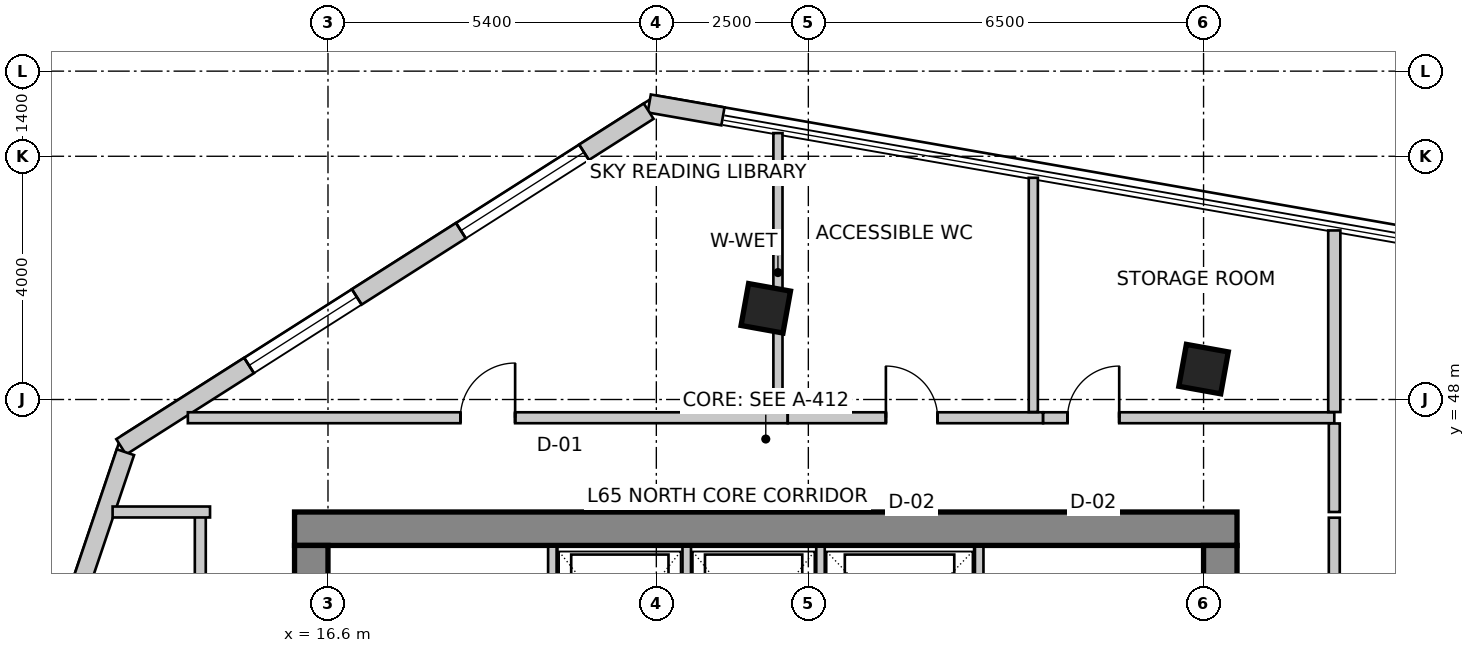
"""IFC4 building model, lengths in metres.
Left out: names, types, materials, properties, quantities, classifications, styles, units other than length and angle.
Written with IfcOpenShell. Run it as: python <this file> out.ifc"""

import sys

from ifc_helpers import new_model, si_unit, direction, frame, frame_2d, origin, origin_2d, place, context, subcontext, project, spatial, rectangle, extrude, source, transform, mapped, element, fill, save


model = new_model("IFC4")
c1 = context("Model", 3, precision=1e-05, world=origin(), true_north=direction((0.0, 1.0)))
c2 = subcontext(c1, "Body", "Model", "MODEL_VIEW")
j1 = project(units=[si_unit("LENGTHUNIT", "METRE"), si_unit("PLANEANGLEUNIT", "RADIAN")], contexts=[c1])
p1 = place(None, origin())
s1 = spatial("IfcSite", under=j1, at=p1, CompositionType="ELEMENT")
p2 = place(p1, origin())
s2 = spatial("IfcBuilding", under=s1, at=p2, CompositionType="ELEMENT")
p3 = place(p2, frame((0.0, 0.0, 256.5)))
s3 = spatial("IfcBuildingStorey", under=s2, at=p3, CompositionType="ELEMENT", Elevation=256.5)
p4 = place(p3, frame((16.05, 45.875, 0.0), z_axis=(0.0, 0.0, 1.0), x_axis=(1.0, 0.0, 0.0)))
e1 = element("IfcWall", 1, at=p4, inside=s3, PredefinedType="SHEAR", context=c2, shape_type="SweptSolid", body=[
    extrude(rectangle(XDim=15.5, YDim=0.55, at=frame_2d((7.75, 0.0))), origin(), (0.0, 0.0, 1.0), 3.6),
])
p5 = place(p3, frame((16.325, 34.2, 0.0), z_axis=(0.0, 0.0, 1.0), x_axis=(0.0, 1.0, 0.0)))
e2 = element("IfcWall", 2, at=p5, inside=s3, PredefinedType="SHEAR", context=c2, shape_type="SweptSolid", body=[
    extrude(rectangle(XDim=11.4, YDim=0.55, at=frame_2d((5.7, 0.0))), origin(), (0.0, 0.0, 1.0), 3.6),
])
m1 = source(origin(), c2, "Body", "SweptSolid", [
    extrude(rectangle(XDim=1.1, YDim=2.15, at=frame_2d((0.55, 1.075))), frame((0.0, 0.285, 0.0), z_axis=(0.0, -1.0, 0.0), x_axis=(1.0, 0.0, 0.0)), (0.0, 0.0, 1.0), 0.57),
])
p6 = place(p5, frame((7.15, 0.0, 0.0)))
e3 = element("IfcOpeningElement", 3, at=p6, cuts=e2, PredefinedType="OPENING", context=c2, shape_type="MappedRepresentation", body=[
    mapped(m1, transform((0.0, 0.0, 0.0), scale=1.0)),
])
p7 = place(p3, frame((31.275, 34.2, 0.0), z_axis=(0.0, 0.0, 1.0), x_axis=(0.0, 1.0, 0.0)))
e4 = element("IfcWall", 4, at=p7, inside=s3, PredefinedType="SHEAR", context=c2, shape_type="SweptSolid", body=[
    extrude(rectangle(XDim=11.4, YDim=0.55, at=frame_2d((5.7, 0.0))), origin(), (0.0, 0.0, 1.0), 3.6),
])
p8 = place(p7, frame((7.35, 0.0, 0.0)))
e5 = element("IfcOpeningElement", 5, at=p8, cuts=e4, PredefinedType="OPENING", context=c2, shape_type="MappedRepresentation", body=[
    mapped(m1, transform((0.0, 0.0, 0.0), scale=1.0)),
])
m2 = source(origin(), c2, "Body", "SweptSolid", [
    extrude(rectangle(XDim=0.7, YDim=0.7, at=origin_2d()), origin(), (0.0, 0.0, 1.0), 3.6),
])
for number, where, z_axis, x_axis in (
    (6, (23.8, 49.5, 0.0), (0.0, 0.0, 1.0), (0.984, -0.177, 0.0)),
    (7, (31.0, 48.5, 0.0), (0.0, 0.0, 1.0), (0.984, -0.177, 0.0)),
):
    element("IfcColumn", number, at=place(p3, frame(where, z_axis=z_axis, x_axis=x_axis)), inside=s3, PredefinedType="COLUMN", context=c2, shape_type="MappedRepresentation", body=[
        mapped(m2, transform((0.0, 0.0, 0.0), scale=1.0)),
    ])
p9 = place(p3, frame((23.095, 52.656, 0.0), z_axis=(0.0, 0.0, 1.0), x_axis=(-0.985008549623, 0.172505527937, 0.0)))
e8 = element("IfcWall", 8, at=p9, inside=s3, PredefinedType="SOLIDWALL", context=c2, shape_type="SweptSolid", body=[
    extrude(rectangle(XDim=1.23, YDim=0.3, at=frame_2d((0.615, 0.0))), origin(), (0.0, 0.0, 1.0), 3.35),
])
p10 = place(p3, frame((21.874, 52.742, 0.0), z_axis=(0.0, 0.0, 1.0), x_axis=(-0.84365659959, -0.536883173482, 0.0)))
e9 = element("IfcWall", 9, at=p10, inside=s3, PredefinedType="SOLIDWALL", context=c2, shape_type="SweptSolid", body=[
    extrude(rectangle(XDim=10.283, YDim=0.3, at=frame_2d((5.142, 0.0))), origin(), (0.0, 0.0, 1.0), 3.35),
])
m3 = source(origin(), c2, "Body", "SweptSolid", [
    extrude(rectangle(XDim=2.4, YDim=2.2, at=frame_2d((1.2, 1.1))), frame((0.0, 0.16, 0.0), z_axis=(0.0, -1.0, 0.0), x_axis=(1.0, 0.0, 0.0)), (0.0, 0.0, 1.0), 0.32),
])
p11 = place(p10, frame((1.26, 0.0, 0.85)))
e10 = element("IfcOpeningElement", 10, at=p11, cuts=e9, PredefinedType="OPENING", context=c2, shape_type="MappedRepresentation", body=[
    mapped(m3, transform((0.0, 0.0, 0.0), scale=1.0)),
])
m4 = source(origin(), c2, "Body", "SweptSolid", [
    extrude(rectangle(XDim=2.1, YDim=2.0, at=frame_2d((1.05, 1.0))), frame((0.0, 0.16, 0.0), z_axis=(0.0, -1.0, 0.0), x_axis=(1.0, 0.0, 0.0)), (0.0, 0.0, 1.0), 0.32),
])
p12 = place(p10, frame((5.69, 0.0, 0.85)))
e11 = element("IfcOpeningElement", 11, at=p12, cuts=e9, PredefinedType="OPENING", context=c2, shape_type="MappedRepresentation", body=[
    mapped(m4, transform((0.0, 0.0, 0.0), scale=1.0)),
])
p13 = place(p3, frame((13.269, 47.134, 0.0), z_axis=(0.0, 0.0, 1.0), x_axis=(-0.3199211297, -0.947444178182, 0.0)))
e12 = element("IfcWall", 12, at=p13, inside=s3, PredefinedType="SOLIDWALL", context=c2, shape_type="SweptSolid", body=[
    extrude(rectangle(XDim=16.132, YDim=0.3, at=frame_2d((8.066, 0.0))), origin(), (0.0, 0.0, 1.0), 3.35),
])
p14 = place(p13, frame((2.585, 0.0, 0.85)))
e13 = element("IfcOpeningElement", 13, at=p14, cuts=e12, PredefinedType="OPENING", context=c2, shape_type="MappedRepresentation", body=[
    mapped(m4, transform((0.0, 0.0, 0.0), scale=1.0)),
])
p15 = place(p13, frame((7.267, 0.0, 0.85)))
e14 = element("IfcOpeningElement", 14, at=p15, cuts=e12, PredefinedType="OPENING", context=c2, shape_type="MappedRepresentation", body=[
    mapped(m3, transform((0.0, 0.0, 0.0), scale=1.0)),
])
p16 = place(p13, frame((12.249, 0.0, 0.85)))
e15 = element("IfcOpeningElement", 15, at=p16, cuts=e12, PredefinedType="OPENING", context=c2, shape_type="MappedRepresentation", body=[
    mapped(m4, transform((0.0, 0.0, 0.0), scale=1.0)),
])
for number, where, z_axis, x_axis in (
    (16, (20.29, 43.28, 0.0), (0.0, 0.0, 1.0), (0.0, 1.0, 0.0)),
    (17, (27.31, 43.28, 0.0), (0.0, 0.0, 1.0), (0.0, 1.0, 0.0)),
):
    element("IfcWall", number, at=place(p3, frame(where, z_axis=z_axis, x_axis=x_axis)), inside=s3, PredefinedType="SOLIDWALL", context=c2, shape_type="SweptSolid", body=[
        extrude(rectangle(XDim=2.3, YDim=0.14, at=frame_2d((1.15, 0.0))), origin(), (0.0, 0.0, 1.0), 3.35),
    ])
for number, where, z_axis, x_axis in (
    (18, (22.5, 43.02, 0.0), (0.0, 0.0, 1.0), (0.0, 1.0, 0.0)),
    (19, (24.7, 43.02, 0.0), (0.0, 0.0, 1.0), (0.0, 1.0, 0.0)),
):
    element("IfcWall", number, at=place(p3, frame(where, z_axis=z_axis, x_axis=x_axis)), inside=s3, PredefinedType="SOLIDWALL", context=c2, shape_type="SweptSolid", body=[
        extrude(rectangle(XDim=2.56, YDim=0.14, at=frame_2d((1.28, 0.0))), origin(), (0.0, 0.0, 1.0), 3.35),
    ])
p17 = place(p3, frame((14.5, 33.744, 0.0), z_axis=(0.0, 0.0, 1.0), x_axis=(0.0, 1.0, 0.0)))
e20 = element("IfcWall", 20, at=p17, inside=s3, PredefinedType="PARTITIONING", context=c2, shape_type="SweptSolid", body=[
    extrude(rectangle(XDim=12.406, YDim=0.18, at=frame_2d((6.203, 0.0))), origin(), (0.0, 0.0, 1.0), 3.35),
])
m5 = source(origin(), c2, "Body", "SweptSolid", [
    extrude(rectangle(XDim=0.9, YDim=2.15, at=frame_2d((0.45, 1.075))), frame((0.0, 0.1, 0.0), z_axis=(0.0, -1.0, 0.0), x_axis=(1.0, 0.0, 0.0)), (0.0, 0.0, 1.0), 0.2),
])
p18 = place(p17, frame((4.37, 0.0, 0.0)))
e21 = element("IfcOpeningElement", 21, at=p18, cuts=e20, PredefinedType="OPENING", context=c2, shape_type="MappedRepresentation", body=[
    mapped(m5, transform((0.0, 0.0, 0.0), scale=1.0)),
])
p19 = place(p3, frame((14.66, 46.15, 0.0), z_axis=(0.0, 0.0, 1.0), x_axis=(-1.0, 0.0, 0.0)))
e22 = element("IfcWall", 22, at=p19, inside=s3, PredefinedType="PARTITIONING", context=c2, shape_type="SweptSolid", body=[
    extrude(rectangle(XDim=1.602, YDim=0.18, at=frame_2d((0.801, 0.0))), origin(), (0.0, 0.0, 1.0), 3.35),
])
p20 = place(p3, frame((14.295, 47.7, 0.0), z_axis=(0.0, 0.0, 1.0), x_axis=(1.0, 0.0, 0.0)))
e23 = element("IfcWall", 23, at=p20, inside=s3, PredefinedType="PARTITIONING", context=c2, shape_type="SweptSolid", body=[
    extrude(rectangle(XDim=9.865, YDim=0.18, at=frame_2d((4.932, 0.0))), origin(), (0.0, 0.0, 1.0), 3.034),
])
p21 = place(p20, frame((4.482, 0.0, 0.0)))
e24 = element("IfcOpeningElement", 24, at=p21, cuts=e23, PredefinedType="OPENING", context=c2, shape_type="MappedRepresentation", body=[
    mapped(m5, transform((0.0, 0.0, 0.0), scale=1.0)),
])
p22 = place(p3, frame((24.162, 47.7, 0.0), z_axis=(0.0, 0.0, 1.0), x_axis=(1.0, 0.0, 0.0)))
e25 = element("IfcWall", 25, at=p22, inside=s3, PredefinedType="PARTITIONING", context=c2, shape_type="SweptSolid", body=[
    extrude(rectangle(XDim=4.198, YDim=0.18, at=frame_2d((2.099, 0.0))), origin(), (0.0, 0.0, 1.0), 3.35),
])
m6 = source(origin(), c2, "Body", "SweptSolid", [
    extrude(rectangle(XDim=0.85, YDim=2.15, at=frame_2d((0.425, 1.075))), frame((0.0, 0.1, 0.0), z_axis=(0.0, -1.0, 0.0), x_axis=(1.0, 0.0, 0.0)), (0.0, 0.0, 1.0), 0.2),
])
p23 = place(p22, frame((1.613, 0.0, 0.0)))
e26 = element("IfcOpeningElement", 26, at=p23, cuts=e25, PredefinedType="OPENING", context=c2, shape_type="MappedRepresentation", body=[
    mapped(m6, transform((0.0, 0.0, 0.0), scale=1.0)),
])
p24 = place(p3, frame((28.362, 47.7, 0.0), z_axis=(0.0, 0.0, 1.0), x_axis=(1.0, 0.0, 0.0)))
e27 = element("IfcWall", 27, at=p24, inside=s3, PredefinedType="PARTITIONING", context=c2, shape_type="SweptSolid", body=[
    extrude(rectangle(XDim=4.788, YDim=0.18, at=frame_2d((2.394, 0.0))), origin(), (0.0, 0.0, 1.0), 2.922),
])
p25 = place(p24, frame((0.401, 0.0, 0.0)))
e28 = element("IfcOpeningElement", 28, at=p25, cuts=e27, PredefinedType="OPENING", context=c2, shape_type="MappedRepresentation", body=[
    mapped(m6, transform((0.0, 0.0, 0.0), scale=1.0)),
])
p26 = place(p3, frame((33.15, 47.606, 0.0), z_axis=(0.0, 0.0, 1.0), x_axis=(0.0, -1.0, 0.0)))
e29 = element("IfcWall", 29, at=p26, inside=s3, PredefinedType="PARTITIONING", context=c2, shape_type="SweptSolid", body=[
    extrude(rectangle(XDim=1.456, YDim=0.18, at=frame_2d((0.728, 0.0))), origin(), (0.0, 0.0, 1.0), 3.35),
])
p27 = place(p3, frame((33.15, 46.056, 0.0), z_axis=(0.0, 0.0, 1.0), x_axis=(0.0, -1.0, 0.0)))
e30 = element("IfcWall", 30, at=p27, inside=s3, PredefinedType="PARTITIONING", context=c2, shape_type="SweptSolid", body=[
    extrude(rectangle(XDim=4.636, YDim=0.18, at=frame_2d((2.318, 0.0))), origin(), (0.0, 0.0, 1.0), 2.922),
])
p28 = place(p27, frame((1.868, 0.0, 0.0)))
e31 = element("IfcOpeningElement", 31, at=p28, cuts=e30, PredefinedType="OPENING", context=c2, shape_type="MappedRepresentation", body=[
    mapped(m5, transform((0.0, 0.0, 0.0), scale=1.0)),
])
p29 = place(p3, frame((24.0, 52.381, 0.0), z_axis=(0.0, 0.0, 1.0), x_axis=(0.0, -1.0, 0.0)))
e32 = element("IfcWall", 32, at=p29, inside=s3, PredefinedType="PARTITIONING", context=c2, shape_type="SweptSolid", body=[
    extrude(rectangle(XDim=4.587, YDim=0.15, at=frame_2d((2.293, 0.0))), origin(), (0.0, 0.0, 1.0), 2.642),
])
p30 = place(p3, frame((28.2, 51.646, 0.0), z_axis=(0.0, 0.0, 1.0), x_axis=(0.0, -1.0, 0.0)))
e33 = element("IfcWall", 33, at=p30, inside=s3, PredefinedType="PARTITIONING", context=c2, shape_type="SweptSolid", body=[
    extrude(rectangle(XDim=3.852, YDim=0.15, at=frame_2d((1.926, 0.0))), origin(), (0.0, 0.0, 1.0), 2.642),
])
p31 = place(p3, frame((33.15, 50.78, 0.0), z_axis=(0.0, 0.0, 1.0), x_axis=(0.0, -1.0, 0.0)))
e34 = element("IfcWall", 34, at=p31, inside=s3, PredefinedType="PARTITIONING", context=c2, shape_type="SweptSolid", body=[
    extrude(rectangle(XDim=2.986, YDim=0.2, at=frame_2d((1.493, 0.0))), origin(), (0.0, 0.0, 1.0), 2.642),
])
m7 = source(origin(), c2, "Body", "SweptSolid", [
    extrude(rectangle(XDim=2.4, YDim=2.2, at=frame_2d((1.2, 1.1))), frame((0.0, -0.015, 0.0), z_axis=(0.0, -1.0, 0.0), x_axis=(1.0, 0.0, 0.0)), (0.0, 0.0, 1.0), 0.06),
])
p32 = place(p11, origin())
e35 = element("IfcWindow", 35, at=p32, inside=s3, PartitioningType="SINGLE_PANEL", PredefinedType="WINDOW", context=c2, shape_type="MappedRepresentation", body=[
    mapped(m7, transform((0.0, 0.0, 0.0), scale=1.0)),
])
fill(e10, e35)
m8 = source(origin(), c2, "Body", "SweptSolid", [
    extrude(rectangle(XDim=2.1, YDim=2.0, at=frame_2d((1.05, 1.0))), frame((0.0, -0.015, 0.0), z_axis=(0.0, -1.0, 0.0), x_axis=(1.0, 0.0, 0.0)), (0.0, 0.0, 1.0), 0.06),
])
p33 = place(p12, origin())
e36 = element("IfcWindow", 36, at=p33, inside=s3, PartitioningType="SINGLE_PANEL", PredefinedType="WINDOW", context=c2, shape_type="MappedRepresentation", body=[
    mapped(m8, transform((0.0, 0.0, 0.0), scale=1.0)),
])
fill(e11, e36)
m9 = source(origin(), c2, "Body", "SweptSolid", [
    extrude(rectangle(XDim=0.9, YDim=2.15, at=frame_2d((0.45, 1.075))), frame((0.0, 0.025, 0.0), z_axis=(0.0, -1.0, 0.0), x_axis=(1.0, 0.0, 0.0)), (0.0, 0.0, 1.0), 0.05),
])
p34 = place(p21, origin())
e37 = element("IfcDoor", 37, at=p34, inside=s3, OperationType="SINGLE_SWING_RIGHT", PredefinedType="DOOR", context=c2, shape_type="MappedRepresentation", body=[
    mapped(m9, transform((0.0, 0.0, 0.0), scale=1.0)),
])
fill(e24, e37)
m10 = source(origin(), c2, "Body", "SweptSolid", [
    extrude(rectangle(XDim=0.85, YDim=2.15, at=frame_2d((0.425, 1.075))), frame((0.0, 0.025, 0.0), z_axis=(0.0, -1.0, 0.0), x_axis=(1.0, 0.0, 0.0)), (0.0, 0.0, 1.0), 0.05),
])
p35 = place(p23, origin())
e38 = element("IfcDoor", 38, at=p35, inside=s3, OperationType="SINGLE_SWING_LEFT", PredefinedType="DOOR", context=c2, shape_type="MappedRepresentation", body=[
    mapped(m10, transform((0.0, 0.0, 0.0), scale=1.0)),
])
fill(e26, e38)
p36 = place(p25, origin())
e39 = element("IfcDoor", 39, at=p36, inside=s3, OperationType="SINGLE_SWING_RIGHT", PredefinedType="DOOR", context=c2, shape_type="MappedRepresentation", body=[
    mapped(m10, transform((0.0, 0.0, 0.0), scale=1.0)),
])
fill(e28, e39)
save(model, sys.argv[1])
